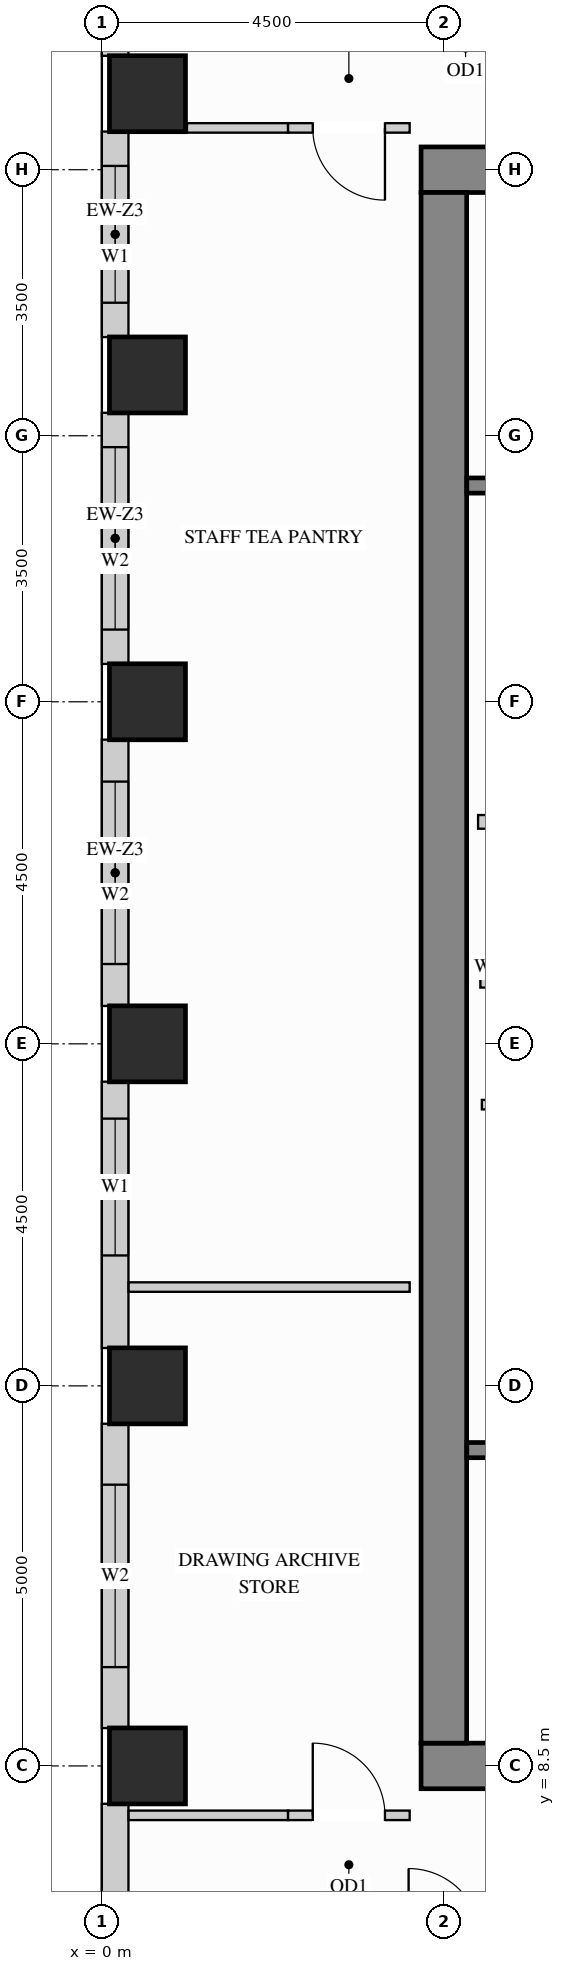
"""IFC4 building model, lengths in metres.
Left out: names, types, materials, properties, quantities, classifications, styles, units other than length and angle.
Written with IfcOpenShell. Run it as: python <this file> out.ifc"""

import sys

from ifc_helpers import new_model, si_unit, direction, frame, frame_2d, origin, origin_2d, place, context, subcontext, project, spatial, rectangle, extrude, source, transform, mapped, element, fill, save


model = new_model("IFC4")
c1 = context("Model", 3, precision=1e-05, world=origin(), true_north=direction((0.0, 1.0)))
c2 = subcontext(c1, "Body", "Model", "MODEL_VIEW")
j1 = project(units=[si_unit("LENGTHUNIT", "METRE"), si_unit("PLANEANGLEUNIT", "RADIAN")], contexts=[c1])
p1 = place(None, origin())
s1 = spatial("IfcSite", under=j1, at=p1, CompositionType="ELEMENT")
p2 = place(p1, origin())
s2 = spatial("IfcBuilding", under=s1, at=p2, CompositionType="ELEMENT")
p3 = place(p2, frame((0.0, 0.0, 175.5)))
s3 = spatial("IfcBuildingStorey", under=s2, at=p3, CompositionType="ELEMENT", Elevation=175.5)
m1 = source(origin(), c2, "Body", "SweptSolid", [
    extrude(rectangle(XDim=1.0, YDim=1.0, at=origin_2d()), origin(), (0.0, 0.0, 1.0), 3.4),
])
for number, where, z_axis, x_axis in (
    (1, (0.6, 13.5, 0.0), (0.0, 0.0, 1.0), (1.0, 0.0, 0.0)),
    (2, (0.6, 18.0, 0.0), (0.0, 0.0, 1.0), (1.0, 0.0, 0.0)),
    (3, (0.6, 22.5, 0.0), (0.0, 0.0, 1.0), (1.0, 0.0, 0.0)),
    (4, (0.6, 26.8, 0.0), (0.0, 0.0, 1.0), (1.0, 0.0, 0.0)),
    (5, (0.6, 30.5, 0.0), (0.0, 0.0, 1.0), (1.0, 0.0, 0.0)),
    (6, (0.6, 8.5, 0.0), (0.0, 0.0, 1.0), (1.0, 0.0, 0.0)),
):
    element("IfcColumn", number, at=place(p3, frame(where, z_axis=z_axis, x_axis=x_axis)), inside=s3, PredefinedType="COLUMN", context=c2, shape_type="MappedRepresentation", body=[
        mapped(m1, transform((0.0, 0.0, 0.0), x_axis=(1.0, 0.0, 0.0), y_axis=(0.0, 1.0, 0.0), z_axis=(0.0, 0.0, 1.0))),
    ])
m2 = source(origin(), c2, "Body", "SweptSolid", [
    extrude(rectangle(XDim=10.6, YDim=0.6, at=frame_2d((5.3, 0.0))), origin(), (0.0, 0.0, 1.0), 3.4),
])
for number, where, z_axis, x_axis in (
    (7, (4.2, 29.5, 0.0), (0.0, 0.0, 1.0), (1.0, 0.0, 0.0)),
    (8, (4.2, 8.5, 0.0), (0.0, 0.0, 1.0), (1.0, 0.0, 0.0)),
):
    element("IfcWall", number, at=place(p3, frame(where, z_axis=z_axis, x_axis=x_axis)), inside=s3, PredefinedType="SHEAR", context=c2, shape_type="MappedRepresentation", body=[
        mapped(m2, transform((0.0, 0.0, 0.0), x_axis=(1.0, 0.0, 0.0), y_axis=(0.0, 1.0, 0.0), z_axis=(0.0, 0.0, 1.0))),
    ])
m3 = source(origin(), c2, "Body", "SweptSolid", [
    extrude(rectangle(XDim=20.4, YDim=0.6, at=frame_2d((10.2, 0.0))), origin(), (0.0, 0.0, 1.0), 3.4),
])
p4 = place(p3, frame((4.5, 8.8, 0.0), z_axis=(0.0, 0.0, 1.0), x_axis=(0.0, 1.0, 0.0)))
e9 = element("IfcWall", 9, at=p4, inside=s3, PredefinedType="SHEAR", context=c2, shape_type="MappedRepresentation", body=[
    mapped(m3, transform((0.0, 0.0, 0.0), x_axis=(1.0, 0.0, 0.0), y_axis=(0.0, 1.0, 0.0), z_axis=(0.0, 0.0, 1.0))),
])
p5 = place(p3, frame((0.175, 34.502, 0.0), z_axis=(0.0, 0.0, 1.0), x_axis=(0.0, -1.0, 0.0)))
e10 = element("IfcWall", 10, at=p5, inside=s3, PredefinedType="SOLIDWALL", context=c2, shape_type="SweptSolid", body=[
    extrude(rectangle(XDim=3.504, YDim=0.35, at=frame_2d((1.752, 0.0))), origin(), (0.0, 0.0, 1.0), 2.612),
])
p6 = place(p5, frame((0.511, 0.0, 0.78)))
e11 = element("IfcOpeningElement", 11, at=p6, cuts=e10, PredefinedType="OPENING", context=c2, shape_type="SweptSolid", body=[
    extrude(rectangle(XDim=1.8, YDim=1.652, at=frame_2d((0.9, 0.826))), frame((0.0, 0.185, 0.0), z_axis=(0.0, -1.0, 0.0), x_axis=(1.0, 0.0, 0.0)), (0.0, 0.0, 1.0), 0.37),
])
p7 = place(p3, frame((0.175, 30.002, 0.0), z_axis=(0.0, 0.0, 1.0), x_axis=(0.0, -1.0, 0.0)))
e12 = element("IfcWall", 12, at=p7, inside=s3, PredefinedType="SOLIDWALL", context=c2, shape_type="SweptSolid", body=[
    extrude(rectangle(XDim=2.704, YDim=0.35, at=frame_2d((1.352, 0.0))), origin(), (0.0, 0.0, 1.0), 2.612),
])
p8 = place(p7, frame((0.452, 0.0, 0.78)))
e13 = element("IfcOpeningElement", 13, at=p8, cuts=e12, PredefinedType="OPENING", context=c2, shape_type="SweptSolid", body=[
    extrude(rectangle(XDim=1.8, YDim=1.652, at=frame_2d((0.9, 0.826))), frame((0.0, 0.185, 0.0), z_axis=(0.0, -1.0, 0.0), x_axis=(1.0, 0.0, 0.0)), (0.0, 0.0, 1.0), 0.37),
])
p9 = place(p3, frame((0.175, 26.302, 0.0), z_axis=(0.0, 0.0, 1.0), x_axis=(0.0, -1.0, 0.0)))
e14 = element("IfcWall", 14, at=p9, inside=s3, PredefinedType="SOLIDWALL", context=c2, shape_type="SweptSolid", body=[
    extrude(rectangle(XDim=3.304, YDim=0.35, at=frame_2d((1.652, 0.0))), origin(), (0.0, 0.0, 1.0), 2.612),
])
p10 = place(p9, frame((0.452, 0.0, 0.78)))
e15 = element("IfcOpeningElement", 15, at=p10, cuts=e14, PredefinedType="OPENING", context=c2, shape_type="SweptSolid", body=[
    extrude(rectangle(XDim=2.4, YDim=1.652, at=frame_2d((1.2, 0.826))), frame((0.0, 0.185, 0.0), z_axis=(0.0, -1.0, 0.0), x_axis=(1.0, 0.0, 0.0)), (0.0, 0.0, 1.0), 0.37),
])
p11 = place(p3, frame((0.175, 22.002, 0.0), z_axis=(0.0, 0.0, 1.0), x_axis=(0.0, -1.0, 0.0)))
e16 = element("IfcWall", 16, at=p11, inside=s3, PredefinedType="SOLIDWALL", context=c2, shape_type="SweptSolid", body=[
    extrude(rectangle(XDim=3.504, YDim=0.35, at=frame_2d((1.752, 0.0))), origin(), (0.0, 0.0, 1.0), 2.612),
])
p12 = place(p11, frame((0.552, 0.0, 0.78)))
e17 = element("IfcOpeningElement", 17, at=p12, cuts=e16, PredefinedType="OPENING", context=c2, shape_type="SweptSolid", body=[
    extrude(rectangle(XDim=2.4, YDim=1.652, at=frame_2d((1.2, 0.826))), frame((0.0, 0.185, 0.0), z_axis=(0.0, -1.0, 0.0), x_axis=(1.0, 0.0, 0.0)), (0.0, 0.0, 1.0), 0.37),
])
p13 = place(p3, frame((0.175, 17.502, 0.0), z_axis=(0.0, 0.0, 1.0), x_axis=(0.0, -1.0, 0.0)))
e18 = element("IfcWall", 18, at=p13, inside=s3, PredefinedType="SOLIDWALL", context=c2, shape_type="SweptSolid", body=[
    extrude(rectangle(XDim=3.504, YDim=0.35, at=frame_2d((1.752, 0.0))), origin(), (0.0, 0.0, 1.0), 2.612),
])
p14 = place(p13, frame((0.486, 0.0, 0.78)))
e19 = element("IfcOpeningElement", 19, at=p14, cuts=e18, PredefinedType="OPENING", context=c2, shape_type="SweptSolid", body=[
    extrude(rectangle(XDim=1.8, YDim=1.652, at=frame_2d((0.9, 0.826))), frame((0.0, 0.185, 0.0), z_axis=(0.0, -1.0, 0.0), x_axis=(1.0, 0.0, 0.0)), (0.0, 0.0, 1.0), 0.37),
])
p15 = place(p3, frame((0.175, 13.002, 0.0), z_axis=(0.0, 0.0, 1.0), x_axis=(0.0, -1.0, 0.0)))
e20 = element("IfcWall", 20, at=p15, inside=s3, PredefinedType="SOLIDWALL", context=c2, shape_type="SweptSolid", body=[
    extrude(rectangle(XDim=4.004, YDim=0.35, at=frame_2d((2.002, 0.0))), origin(), (0.0, 0.0, 1.0), 2.612),
])
p16 = place(p15, frame((0.802, 0.0, 0.78)))
e21 = element("IfcOpeningElement", 21, at=p16, cuts=e20, PredefinedType="OPENING", context=c2, shape_type="SweptSolid", body=[
    extrude(rectangle(XDim=2.4, YDim=1.652, at=frame_2d((1.2, 0.826))), frame((0.0, 0.185, 0.0), z_axis=(0.0, -1.0, 0.0), x_axis=(1.0, 0.0, 0.0)), (0.0, 0.0, 1.0), 0.37),
])
p17 = place(p3, frame((0.175, 8.002, 0.0), z_axis=(0.0, 0.0, 1.0), x_axis=(0.0, -1.0, 0.0)))
e22 = element("IfcWall", 22, at=p17, inside=s3, PredefinedType="SOLIDWALL", context=c2, shape_type="SweptSolid", body=[
    extrude(rectangle(XDim=4.004, YDim=0.35, at=frame_2d((2.002, 0.0))), origin(), (0.0, 0.0, 1.0), 2.612),
])
p18 = place(p17, frame((2.268, 0.0, 0.78)))
e23 = element("IfcOpeningElement", 23, at=p18, cuts=e22, PredefinedType="OPENING", context=c2, shape_type="SweptSolid", body=[
    extrude(rectangle(XDim=1.2, YDim=1.652, at=frame_2d((0.6, 0.826))), frame((0.0, 0.185, 0.0), z_axis=(0.0, -1.0, 0.0), x_axis=(1.0, 0.0, 0.0)), (0.0, 0.0, 1.0), 0.37),
])
m4 = source(origin(), c2, "Body", "SweptSolid", [
    extrude(rectangle(XDim=2.2, YDim=0.18, at=frame_2d((1.1, 0.0))), origin(), (0.0, 0.0, 1.0), 3.385),
])
p19 = place(p3, frame((4.95, 20.92, 0.0), z_axis=(0.0, 0.0, 1.0), x_axis=(1.0, 0.0, 0.0)))
e24 = element("IfcWall", 24, at=p19, inside=s3, PredefinedType="PARTITIONING", context=c2, shape_type="MappedRepresentation", body=[
    mapped(m4, transform((0.0, 0.0, 0.0), x_axis=(1.0, 0.0, 0.0), y_axis=(0.0, 1.0, 0.0), z_axis=(0.0, 0.0, 1.0))),
])
p20 = place(p3, frame((5.0, 17.2, 0.0), z_axis=(0.0, 0.0, 1.0), x_axis=(1.0, 0.0, 0.0)))
e25 = element("IfcWall", 25, at=p20, inside=s3, PredefinedType="PARTITIONING", context=c2, shape_type="SweptSolid", body=[
    extrude(rectangle(XDim=2.4, YDim=0.125, at=frame_2d((1.2, 0.0))), origin(), (0.0, 0.0, 1.0), 3.385),
])
p21 = place(p20, frame((0.7, 0.0, 0.0)))
e26 = element("IfcOpeningElement", 26, at=p21, cuts=e25, PredefinedType="OPENING", context=c2, shape_type="SweptSolid", body=[
    extrude(rectangle(XDim=0.85, YDim=2.1, at=frame_2d((0.425, 1.05))), frame((0.0, 0.073, 0.0), z_axis=(0.0, -1.0, 0.0), x_axis=(1.0, 0.0, 0.0)), (0.0, 0.0, 1.0), 0.145),
])
m5 = source(origin(), c2, "Body", "SweptSolid", [
    extrude(rectangle(XDim=1.33, YDim=0.125, at=frame_2d((0.665, 0.0))), origin(), (0.0, 0.0, 1.0), 3.385),
])
p22 = place(p3, frame((1.12, 30.05, 0.0), z_axis=(0.0, 0.0, 1.0), x_axis=(1.0, 0.0, 0.0)))
e27 = element("IfcWall", 27, at=p22, inside=s3, PredefinedType="PARTITIONING", context=c2, shape_type="MappedRepresentation", body=[
    mapped(m5, transform((0.0, 0.0, 0.0), x_axis=(1.0, 0.0, 0.0), y_axis=(0.0, 1.0, 0.0), z_axis=(0.0, 0.0, 1.0))),
])
p23 = place(p3, frame((2.45, 30.05, 0.0), z_axis=(0.0, 0.0, 1.0), x_axis=(1.0, 0.0, 0.0)))
e28 = element("IfcWall", 28, at=p23, inside=s3, PredefinedType="PARTITIONING", context=c2, shape_type="SweptSolid", body=[
    extrude(rectangle(XDim=1.6, YDim=0.125, at=frame_2d((0.8, 0.0))), origin(), (0.0, 0.0, 1.0), 3.385),
])
p24 = place(p23, frame((0.325, 0.0, 0.0)))
e29 = element("IfcOpeningElement", 29, at=p24, cuts=e28, PredefinedType="OPENING", context=c2, shape_type="SweptSolid", body=[
    extrude(rectangle(XDim=0.95, YDim=2.15, at=frame_2d((0.475, 1.075))), frame((0.0, 0.073, 0.0), z_axis=(0.0, -1.0, 0.0), x_axis=(1.0, 0.0, 0.0)), (0.0, 0.0, 1.0), 0.145),
])
m6 = source(origin(), c2, "Body", "SweptSolid", [
    extrude(rectangle(XDim=2.098, YDim=0.125, at=frame_2d((1.049, 0.0))), origin(), (0.0, 0.0, 1.0), 3.385),
])
p25 = place(p3, frame((0.352, 7.85, 0.0), z_axis=(0.0, 0.0, 1.0), x_axis=(1.0, 0.0, 0.0)))
e30 = element("IfcWall", 30, at=p25, inside=s3, PredefinedType="PARTITIONING", context=c2, shape_type="MappedRepresentation", body=[
    mapped(m6, transform((0.0, 0.0, 0.0), x_axis=(1.0, 0.0, 0.0), y_axis=(0.0, 1.0, 0.0), z_axis=(0.0, 0.0, 1.0))),
])
p26 = place(p3, frame((2.45, 7.85, 0.0), z_axis=(0.0, 0.0, 1.0), x_axis=(1.0, 0.0, 0.0)))
e31 = element("IfcWall", 31, at=p26, inside=s3, PredefinedType="PARTITIONING", context=c2, shape_type="SweptSolid", body=[
    extrude(rectangle(XDim=1.6, YDim=0.125, at=frame_2d((0.8, 0.0))), origin(), (0.0, 0.0, 1.0), 3.385),
])
p27 = place(p26, frame((0.325, 0.0, 0.0)))
e32 = element("IfcOpeningElement", 32, at=p27, cuts=e31, PredefinedType="OPENING", context=c2, shape_type="SweptSolid", body=[
    extrude(rectangle(XDim=0.95, YDim=2.15, at=frame_2d((0.475, 1.075))), frame((0.0, 0.073, 0.0), z_axis=(0.0, -1.0, 0.0), x_axis=(1.0, 0.0, 0.0)), (0.0, 0.0, 1.0), 0.145),
])
m7 = source(origin(), c2, "Body", "SweptSolid", [
    extrude(rectangle(XDim=3.698, YDim=0.125, at=frame_2d((1.849, 0.0))), origin(), (0.0, 0.0, 1.0), 3.385),
])
p28 = place(p3, frame((0.352, 14.8, 0.0), z_axis=(0.0, 0.0, 1.0), x_axis=(1.0, 0.0, 0.0)))
e33 = element("IfcWall", 33, at=p28, inside=s3, PredefinedType="PARTITIONING", context=c2, shape_type="MappedRepresentation", body=[
    mapped(m7, transform((0.0, 0.0, 0.0), x_axis=(1.0, 0.0, 0.0), y_axis=(0.0, 1.0, 0.0), z_axis=(0.0, 0.0, 1.0))),
])
m8 = source(origin(), c2, "Body", "SweptSolid", [
    extrude(rectangle(XDim=2.09, YDim=0.2, at=frame_2d((1.045, 0.0))), origin(), (0.0, 0.0, 1.0), 3.385),
])
p29 = place(p3, frame((4.98, 18.84, 0.0), z_axis=(0.0, 0.0, 1.0), x_axis=(1.0, 0.0, 0.0)))
e34 = element("IfcWall", 34, at=p29, inside=s3, PredefinedType="PARTITIONING", context=c2, shape_type="MappedRepresentation", body=[
    mapped(m8, transform((0.0, 0.0, 0.0), x_axis=(1.0, 0.0, 0.0), y_axis=(0.0, 1.0, 0.0), z_axis=(0.0, 0.0, 1.0))),
])
p30 = place(p3, frame((4.802, 12.655, 0.0), z_axis=(0.0, 0.0, 1.0), x_axis=(1.0, 0.0, 0.0)))
e35 = element("IfcWall", 35, at=p30, inside=s3, PredefinedType="SHEAR", context=c2, shape_type="SweptSolid", body=[
    extrude(rectangle(XDim=7.603, YDim=0.2, at=frame_2d((3.802, 0.0))), origin(), (0.0, 0.0, 1.0), 3.4),
])
p31 = place(p30, frame((0.4, 0.0, 0.0)))
e36 = element("IfcOpeningElement", 36, at=p31, cuts=e35, PredefinedType="OPENING", context=c2, shape_type="SweptSolid", body=[
    extrude(rectangle(XDim=1.1, YDim=2.15, at=frame_2d((0.55, 1.075))), frame((0.0, 0.11, 0.0), z_axis=(0.0, -1.0, 0.0), x_axis=(1.0, 0.0, 0.0)), (0.0, 0.0, 1.0), 0.22),
])
p32 = place(p3, frame((4.802, 25.345, 0.0), z_axis=(0.0, 0.0, 1.0), x_axis=(1.0, 0.0, 0.0)))
e37 = element("IfcWall", 37, at=p32, inside=s3, PredefinedType="SHEAR", context=c2, shape_type="SweptSolid", body=[
    extrude(rectangle(XDim=7.603, YDim=0.2, at=frame_2d((3.802, 0.0))), origin(), (0.0, 0.0, 1.0), 3.4),
])
p33 = place(p32, frame((0.4, 0.0, 0.0)))
e38 = element("IfcOpeningElement", 38, at=p33, cuts=e37, PredefinedType="OPENING", context=c2, shape_type="SweptSolid", body=[
    extrude(rectangle(XDim=1.1, YDim=2.15, at=frame_2d((0.55, 1.075))), frame((0.0, 0.11, 0.0), z_axis=(0.0, -1.0, 0.0), x_axis=(1.0, 0.0, 0.0)), (0.0, 0.0, 1.0), 0.22),
])
m9 = source(origin(), c2, "Body", "SweptSolid", [
    extrude(rectangle(XDim=0.95, YDim=2.15, at=frame_2d((0.475, 1.075))), frame((0.0, 0.025, 0.0), z_axis=(0.0, -1.0, 0.0), x_axis=(1.0, 0.0, 0.0)), (0.0, 0.0, 1.0), 0.05),
])
p34 = place(p27, origin())
e39 = element("IfcDoor", 39, at=p34, inside=s3, OperationType="SINGLE_SWING_LEFT", PredefinedType="DOOR", context=c2, shape_type="MappedRepresentation", body=[
    mapped(m9, transform((0.0, 0.0, 0.0), x_axis=(1.0, 0.0, 0.0), y_axis=(0.0, 1.0, 0.0), z_axis=(0.0, 0.0, 1.0))),
])
fill(e32, e39)
p35 = place(p24, origin())
e40 = element("IfcDoor", 40, at=p35, inside=s3, OperationType="SINGLE_SWING_RIGHT", PredefinedType="DOOR", context=c2, shape_type="MappedRepresentation", body=[
    mapped(m9, transform((0.0, 0.0, 0.0), x_axis=(1.0, 0.0, 0.0), y_axis=(0.0, 1.0, 0.0), z_axis=(0.0, 0.0, 1.0))),
])
fill(e29, e40)
m10 = source(origin(), c2, "Body", "SweptSolid", [
    extrude(rectangle(XDim=1.8, YDim=1.652, at=frame_2d((0.9, 0.826))), frame((0.0, 0.03, 0.0), z_axis=(0.0, -1.0, 0.0), x_axis=(1.0, 0.0, 0.0)), (0.0, 0.0, 1.0), 0.06),
])
p36 = place(p8, origin())
e41 = element("IfcWindow", 41, at=p36, inside=s3, PartitioningType="SINGLE_PANEL", PredefinedType="WINDOW", context=c2, shape_type="MappedRepresentation", body=[
    mapped(m10, transform((0.0, 0.0, 0.0), x_axis=(1.0, 0.0, 0.0), y_axis=(0.0, 1.0, 0.0), z_axis=(0.0, 0.0, 1.0))),
])
fill(e13, e41)
p37 = place(p14, origin())
e42 = element("IfcWindow", 42, at=p37, inside=s3, PartitioningType="SINGLE_PANEL", PredefinedType="WINDOW", context=c2, shape_type="MappedRepresentation", body=[
    mapped(m10, transform((0.0, 0.0, 0.0), x_axis=(1.0, 0.0, 0.0), y_axis=(0.0, 1.0, 0.0), z_axis=(0.0, 0.0, 1.0))),
])
fill(e19, e42)
m11 = source(origin(), c2, "Body", "SweptSolid", [
    extrude(rectangle(XDim=2.4, YDim=1.652, at=frame_2d((1.2, 0.826))), frame((0.0, 0.03, 0.0), z_axis=(0.0, -1.0, 0.0), x_axis=(1.0, 0.0, 0.0)), (0.0, 0.0, 1.0), 0.06),
])
p38 = place(p10, origin())
e43 = element("IfcWindow", 43, at=p38, inside=s3, PartitioningType="SINGLE_PANEL", PredefinedType="WINDOW", context=c2, shape_type="MappedRepresentation", body=[
    mapped(m11, transform((0.0, 0.0, 0.0), x_axis=(1.0, 0.0, 0.0), y_axis=(0.0, 1.0, 0.0), z_axis=(0.0, 0.0, 1.0))),
])
fill(e15, e43)
p39 = place(p12, origin())
e44 = element("IfcWindow", 44, at=p39, inside=s3, PartitioningType="SINGLE_PANEL", PredefinedType="WINDOW", context=c2, shape_type="MappedRepresentation", body=[
    mapped(m11, transform((0.0, 0.0, 0.0), x_axis=(1.0, 0.0, 0.0), y_axis=(0.0, 1.0, 0.0), z_axis=(0.0, 0.0, 1.0))),
])
fill(e17, e44)
p40 = place(p16, origin())
e45 = element("IfcWindow", 45, at=p40, inside=s3, PartitioningType="SINGLE_PANEL", PredefinedType="WINDOW", context=c2, shape_type="MappedRepresentation", body=[
    mapped(m11, transform((0.0, 0.0, 0.0), x_axis=(1.0, 0.0, 0.0), y_axis=(0.0, 1.0, 0.0), z_axis=(0.0, 0.0, 1.0))),
])
fill(e21, e45)
save(model, sys.argv[1])
